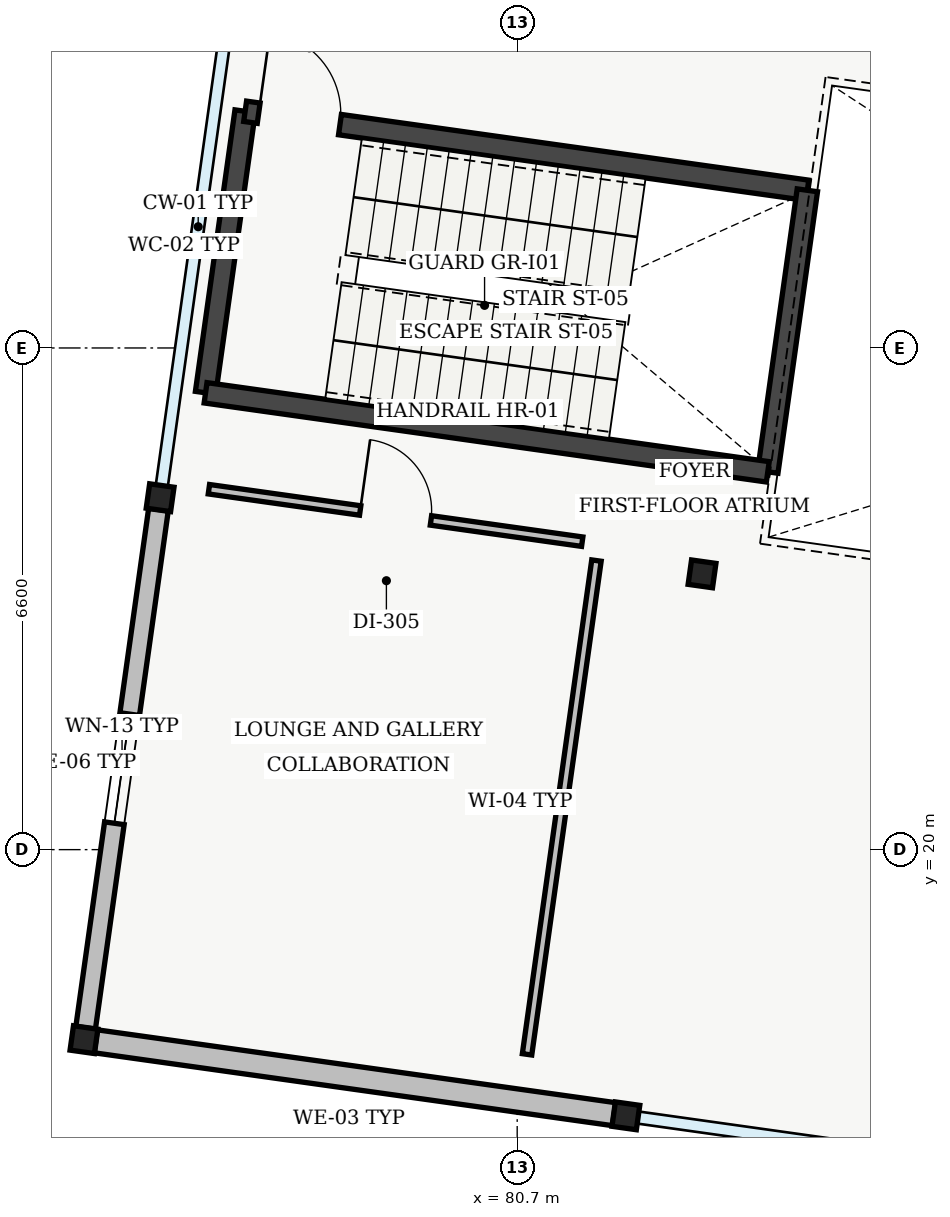
"""IFC4 building model, lengths in metres.
Left out: names, types, materials, properties, quantities, classifications, styles, units other than length and angle.
Written with IfcOpenShell. Run it as: python <this file> out.ifc"""

import sys

from ifc_helpers import new_model, si_unit, direction, frame, frame_2d, origin, origin_2d, place, context, subcontext, project, spatial, rectangle, hollow_circle, extrude, element, fill, save


model = new_model("IFC4")
c1 = context("Model", 3, precision=1e-05, world=origin(), true_north=direction((0.0, 1.0)))
c2 = subcontext(c1, "Body", "Model", "MODEL_VIEW")
j1 = project(units=[si_unit("LENGTHUNIT", "METRE"), si_unit("PLANEANGLEUNIT", "RADIAN")], contexts=[c1])
p1 = place(None, origin())
s1 = spatial("IfcSite", under=j1, at=p1, CompositionType="ELEMENT")
p2 = place(p1, origin())
s2 = spatial("IfcBuilding", under=s1, at=p2, CompositionType="ELEMENT")
p3 = place(p2, frame((0.0, 0.0, 5.1)))
s3 = spatial("IfcBuildingStorey", under=s2, at=p3, CompositionType="ELEMENT", Elevation=5.1)
for number, where, z_axis, x_axis in (
    (1, (75.0, 17.5, 0.0), (0.0, 0.0, 1.0), (0.99, -0.139, 0.0)),
    (2, (76.002, 24.63, 0.0), (0.0, 0.0, 1.0), (0.99, -0.139, 0.0)),
    (3, (82.13, 16.498, 0.0), (0.0, 0.0, 1.0), (0.99, -0.139, 0.0)),
    (4, (83.132, 23.628, 0.0), (0.0, 0.0, 1.0), (0.99, -0.139, 0.0)),
):
    element("IfcColumn", number, at=place(p3, frame(where, z_axis=z_axis, x_axis=x_axis)), inside=s3, PredefinedType="COLUMN", context=c2, shape_type="SweptSolid", body=[
        extrude(hollow_circle(Radius=0.162, WallThickness=0.012, at=origin_2d()), origin(), (0.0, 0.0, 1.0), 4.31),
    ])
p4 = place(p3, frame((75.022, 17.656, 0.0), z_axis=(0.0, 0.0, 1.0), x_axis=(0.139197247179, 0.990264674912, 0.0)))
e5 = element("IfcWall", 5, at=p4, inside=s3, PredefinedType="STANDARD", context=c2, shape_type="SweptSolid", body=[
    extrude(rectangle(XDim=6.886, YDim=0.26, at=frame_2d((3.443, 0.0))), origin(), (0.0, 0.0, 1.0), 4.045),
])
p5 = place(p4, frame((2.718, 0.0, 0.95)))
e6 = element("IfcOpeningElement", 6, at=p5, cuts=e5, PredefinedType="OPENING", context=c2, shape_type="SweptSolid", body=[
    extrude(rectangle(XDim=1.45, YDim=1.35, at=frame_2d((0.725, 0.675))), frame((0.0, 0.13, 0.0), z_axis=(0.0, -1.0, 0.0), x_axis=(1.0, 0.0, 0.0)), (0.0, 0.0, 1.0), 0.26),
])
p6 = place(p3, frame((81.974, 16.52, 0.0), z_axis=(0.0, 0.0, 1.0), x_axis=(-0.990264674912, 0.139197247179, 0.0)))
e7 = element("IfcWall", 7, at=p6, inside=s3, PredefinedType="STANDARD", context=c2, shape_type="SweptSolid", body=[
    extrude(rectangle(XDim=6.886, YDim=0.305, at=frame_2d((3.443, 0.0))), origin(), (0.0, 0.0, 1.0), 4.045),
])
p7 = place(p3, frame((76.6, 26.01, 0.0), z_axis=(0.0, 0.0, 1.0), x_axis=(0.139172815303, 0.990268108888, 0.0)))
e8 = element("IfcWall", 8, at=p7, inside=s3, PredefinedType="SHEAR", context=c2, shape_type="SweptSolid", body=[
    extrude(rectangle(XDim=3.74, YDim=0.27, at=frame_2d((1.87, 0.0))), origin(), (0.0, 0.0, 1.0), 4.28),
])
p8 = place(p3, frame((77.12, 29.714, 0.0), z_axis=(0.0, 0.0, 1.0), x_axis=(0.990265308789, -0.139192737628, 0.0)))
e9 = element("IfcWall", 9, at=p8, inside=s3, PredefinedType="SHEAR", context=c2, shape_type="SweptSolid", body=[
    extrude(rectangle(XDim=7.47, YDim=0.27, at=frame_2d((3.735, 0.0))), origin(), (0.0, 0.0, 1.0), 4.28),
])
p9 = place(p8, frame((0.18, 0.0, 0.0)))
e10 = element("IfcOpeningElement", 10, at=p9, cuts=e9, PredefinedType="OPENING", context=c2, shape_type="SweptSolid", body=[
    extrude(rectangle(XDim=1.08, YDim=2.15, at=frame_2d((0.54, 1.075))), frame((0.0, 0.135, 0.0), z_axis=(0.0, -1.0, 0.0), x_axis=(1.0, 0.0, 0.0)), (0.0, 0.0, 1.0), 0.27),
])
p10 = place(p3, frame((84.518, 28.674, 0.0), z_axis=(0.0, 0.0, 1.0), x_axis=(-0.139172815303, -0.990268108888, 0.0)))
e11 = element("IfcWall", 11, at=p10, inside=s3, PredefinedType="SHEAR", context=c2, shape_type="SweptSolid", body=[
    extrude(rectangle(XDim=3.74, YDim=0.27, at=frame_2d((1.87, 0.0))), origin(), (0.0, 0.0, 1.0), 4.28),
])
p11 = place(p3, frame((83.997, 24.97, 0.0), z_axis=(0.0, 0.0, 1.0), x_axis=(-0.990265308789, 0.139192737628, 0.0)))
e12 = element("IfcWall", 12, at=p11, inside=s3, PredefinedType="SHEAR", context=c2, shape_type="SweptSolid", body=[
    extrude(rectangle(XDim=7.47, YDim=0.27, at=frame_2d((3.735, 0.0))), origin(), (0.0, 0.0, 1.0), 4.28),
])
p12 = place(p3, frame((80.83, 17.307, 0.0), z_axis=(0.0, 0.0, 1.0), x_axis=(0.139185834999, 0.990266279006, 0.0)))
e13 = element("IfcWall", 13, at=p12, inside=s3, PredefinedType="PARTITIONING", context=c2, shape_type="SweptSolid", body=[
    extrude(rectangle(XDim=6.56, YDim=0.125, at=frame_2d((3.28, 0.0))), origin(), (0.0, 0.0, 1.0), 3.95),
])
p13 = place(p3, frame((81.556, 24.052, 0.0), z_axis=(0.0, 0.0, 1.0), x_axis=(-0.990271738652, 0.139146985694, 0.0)))
e14 = element("IfcWall", 14, at=p13, inside=s3, PredefinedType="PARTITIONING", context=c2, shape_type="SweptSolid", body=[
    extrude(rectangle(XDim=4.96, YDim=0.125, at=frame_2d((2.48, 0.0))), origin(), (0.0, 0.0, 1.0), 3.95),
])
p14 = place(p13, frame((2.01, 0.0, 0.0)))
e15 = element("IfcOpeningElement", 15, at=p14, cuts=e14, PredefinedType="OPENING", context=c2, shape_type="SweptSolid", body=[
    extrude(rectangle(XDim=0.94, YDim=2.12, at=frame_2d((0.47, 1.06))), frame((0.0, 0.062, 0.0), z_axis=(0.0, -1.0, 0.0), x_axis=(1.0, 0.0, 0.0)), (0.0, 0.0, 1.0), 0.125),
])
p15 = place(p5, origin())
e16 = element("IfcWindow", 16, at=p15, inside=s3, PartitioningType="SINGLE_PANEL", PredefinedType="WINDOW", context=c2, shape_type="SweptSolid", body=[
    extrude(rectangle(XDim=1.45, YDim=1.35, at=frame_2d((0.725, 0.675))), frame((0.0, 0.03, 0.0), z_axis=(0.0, -1.0, 0.0), x_axis=(1.0, 0.0, 0.0)), (0.0, 0.0, 1.0), 0.06),
])
fill(e6, e16)
p16 = place(p9, origin())
e17 = element("IfcDoor", 17, at=p16, inside=s3, OperationType="SINGLE_SWING_LEFT", PredefinedType="DOOR", context=c2, shape_type="SweptSolid", body=[
    extrude(rectangle(XDim=1.08, YDim=2.15, at=frame_2d((0.54, 1.075))), frame((0.0, 0.025, 0.0), z_axis=(0.0, -1.0, 0.0), x_axis=(1.0, 0.0, 0.0)), (0.0, 0.0, 1.0), 0.05),
])
fill(e10, e17)
p17 = place(p14, origin())
e18 = element("IfcDoor", 18, at=p17, inside=s3, OperationType="SINGLE_SWING_RIGHT", PredefinedType="DOOR", context=c2, shape_type="SweptSolid", body=[
    extrude(rectangle(XDim=0.94, YDim=2.12, at=frame_2d((0.47, 1.06))), frame((0.0, 0.025, 0.0), z_axis=(0.0, -1.0, 0.0), x_axis=(1.0, 0.0, 0.0)), (0.0, 0.0, 1.0), 0.05),
])
fill(e15, e18)
save(model, sys.argv[1])
